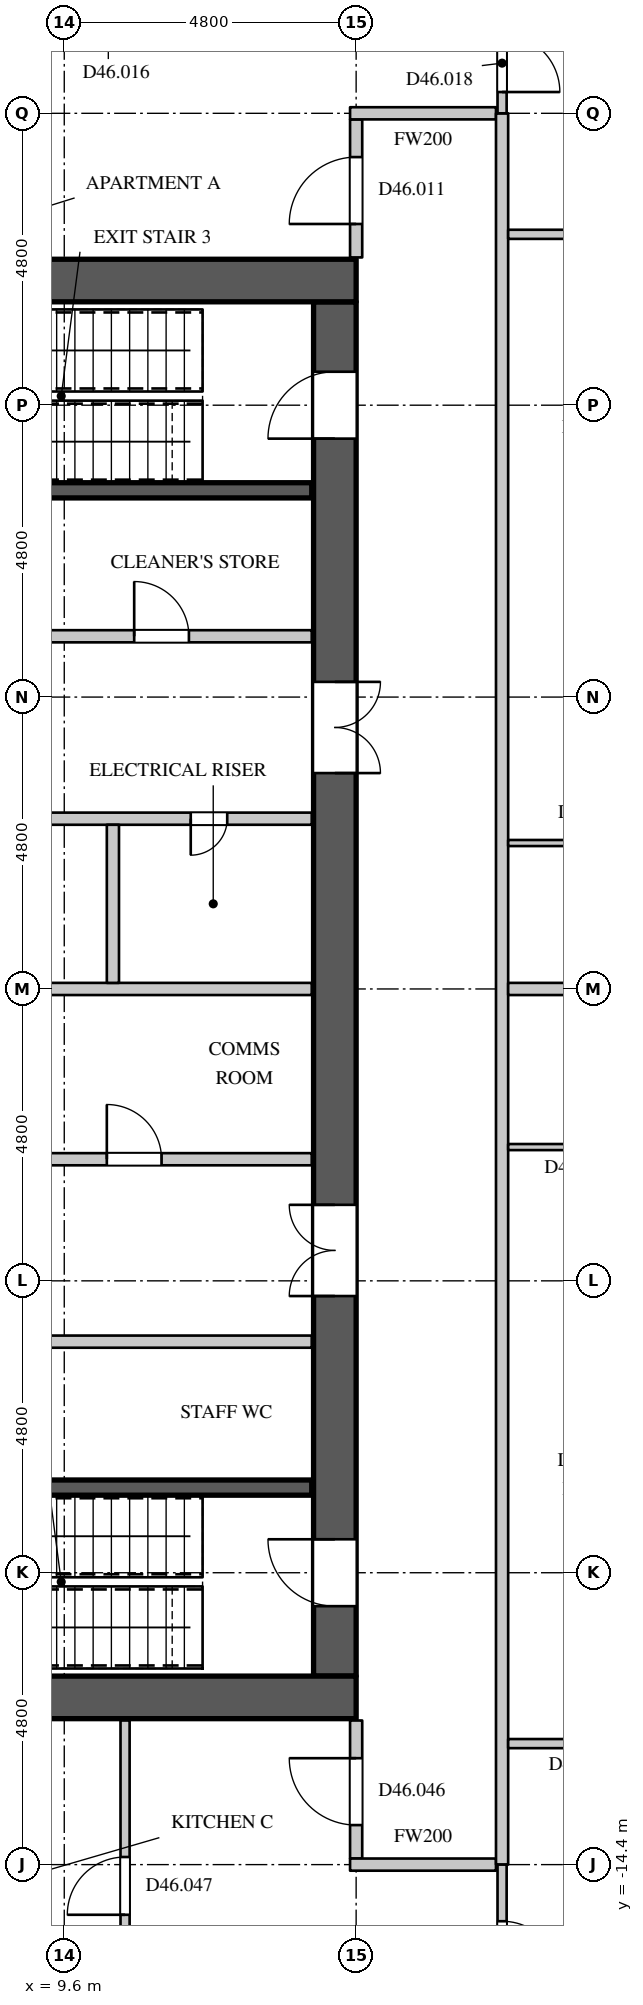
"""IFC4 building model, lengths in metres.
Left out: names, types, materials, properties, quantities, classifications, styles, units other than length and angle.
Written with IfcOpenShell. Run it as: python <this file> out.ifc"""

import sys

from ifc_helpers import new_model, si_unit, direction, frame, frame_2d, origin, place, context, subcontext, project, spatial, rectangle, extrude, element, fill, save


model = new_model("IFC4")
c1 = context("Model", 3, precision=1e-05, world=origin(), true_north=direction((0.0, 1.0)))
c2 = subcontext(c1, "Body", "Model", "MODEL_VIEW")
j1 = project(units=[si_unit("LENGTHUNIT", "METRE"), si_unit("PLANEANGLEUNIT", "RADIAN")], contexts=[c1])
p1 = place(None, origin())
s1 = spatial("IfcSite", under=j1, at=p1, CompositionType="ELEMENT")
p2 = place(p1, origin())
s2 = spatial("IfcBuilding", under=s1, at=p2, CompositionType="ELEMENT")
p3 = place(p2, frame((0.0, 0.0, 200.1)))
s3 = spatial("IfcBuildingStorey", under=s2, at=p3, CompositionType="ELEMENT", Elevation=200.1)
for number, where, z_axis, x_axis in (
    (1, (-14.4, 11.65, 0.0), (0.0, 0.0, 1.0), (1.0, 0.0, 0.0)),
    (2, (-14.4, -11.65, 0.0), (0.0, 0.0, 1.0), (1.0, 0.0, 0.0)),
):
    element("IfcWall", number, at=place(p3, frame(where, z_axis=z_axis, x_axis=x_axis)), inside=s3, PredefinedType="SHEAR", context=c2, shape_type="SweptSolid", body=[
        extrude(rectangle(XDim=28.8, YDim=0.7, at=frame_2d((14.4, 0.0))), origin(), (0.0, 0.0, 1.0), 4.2),
    ])
p4 = place(p3, frame((14.05, -11.3, 0.0), z_axis=(0.0, 0.0, 1.0), x_axis=(0.0, 1.0, 0.0)))
e3 = element("IfcWall", 3, at=p4, inside=s3, PredefinedType="SHEAR", context=c2, shape_type="SweptSolid", body=[
    extrude(rectangle(XDim=22.6, YDim=0.7, at=frame_2d((11.3, 0.0))), origin(), (0.0, 0.0, 1.0), 4.2),
])
p5 = place(p4, frame((20.35, 0.0, 0.0)))
e4 = element("IfcOpeningElement", 4, at=p5, cuts=e3, PredefinedType="OPENING", context=c2, shape_type="SweptSolid", body=[
    extrude(rectangle(XDim=1.1, YDim=2.2, at=frame_2d((0.55, 1.1))), frame((0.0, 0.36, 0.0), z_axis=(0.0, -1.0, 0.0), x_axis=(1.0, 0.0, 0.0)), (0.0, 0.0, 1.0), 0.72),
])
p6 = place(p4, frame((1.15, 0.0, 0.0)))
e5 = element("IfcOpeningElement", 5, at=p6, cuts=e3, PredefinedType="OPENING", context=c2, shape_type="SweptSolid", body=[
    extrude(rectangle(XDim=1.1, YDim=2.2, at=frame_2d((0.55, 1.1))), frame((0.0, 0.36, 0.0), z_axis=(0.0, -1.0, 0.0), x_axis=(1.0, 0.0, 0.0)), (0.0, 0.0, 1.0), 0.72),
])
p7 = place(p4, frame((14.85, 0.0, 0.0)))
e6 = element("IfcOpeningElement", 6, at=p7, cuts=e3, PredefinedType="OPENING", context=c2, shape_type="SweptSolid", body=[
    extrude(rectangle(XDim=1.5, YDim=2.4, at=frame_2d((0.75, 1.2))), frame((0.0, 0.36, 0.0), z_axis=(0.0, -1.0, 0.0), x_axis=(1.0, 0.0, 0.0)), (0.0, 0.0, 1.0), 0.72),
])
p8 = place(p4, frame((6.25, 0.0, 0.0)))
e7 = element("IfcOpeningElement", 7, at=p8, cuts=e3, PredefinedType="OPENING", context=c2, shape_type="SweptSolid", body=[
    extrude(rectangle(XDim=1.5, YDim=2.4, at=frame_2d((0.75, 1.2))), frame((0.0, 0.36, 0.0), z_axis=(0.0, -1.0, 0.0), x_axis=(1.0, 0.0, 0.0)), (0.0, 0.0, 1.0), 0.72),
])
p9 = place(p3, frame((-7.7, 5.8, 0.0), z_axis=(0.0, 0.0, 1.0), x_axis=(1.0, 0.0, 0.0)))
e8 = element("IfcWall", 8, at=p9, inside=s3, PredefinedType="PARTITIONING", context=c2, shape_type="SweptSolid", body=[
    extrude(rectangle(XDim=21.37, YDim=0.2, at=frame_2d((10.685, 0.0))), origin(), (0.0, 0.0, 1.0), 3.798),
])
p10 = place(p9, frame((1.35, 0.0, 0.0)))
e9 = element("IfcOpeningElement", 9, at=p10, cuts=e8, PredefinedType="OPENING", context=c2, shape_type="SweptSolid", body=[
    extrude(rectangle(XDim=0.9, YDim=2.2, at=frame_2d((0.45, 1.1))), frame((0.0, 0.11, 0.0), z_axis=(0.0, -1.0, 0.0), x_axis=(1.0, 0.0, 0.0)), (0.0, 0.0, 1.0), 0.22),
])
p11 = place(p9, frame((5.85, 0.0, 0.0)))
e10 = element("IfcOpeningElement", 10, at=p11, cuts=e8, PredefinedType="OPENING", context=c2, shape_type="SweptSolid", body=[
    extrude(rectangle(XDim=0.9, YDim=2.2, at=frame_2d((0.45, 1.1))), frame((0.0, 0.11, 0.0), z_axis=(0.0, -1.0, 0.0), x_axis=(1.0, 0.0, 0.0)), (0.0, 0.0, 1.0), 0.22),
])
p12 = place(p9, frame((12.3, 0.0, 0.0)))
e11 = element("IfcOpeningElement", 11, at=p12, cuts=e8, PredefinedType="OPENING", context=c2, shape_type="SweptSolid", body=[
    extrude(rectangle(XDim=0.9, YDim=2.2, at=frame_2d((0.45, 1.1))), frame((0.0, 0.11, 0.0), z_axis=(0.0, -1.0, 0.0), x_axis=(1.0, 0.0, 0.0)), (0.0, 0.0, 1.0), 0.22),
])
p13 = place(p9, frame((18.45, 0.0, 0.0)))
e12 = element("IfcOpeningElement", 12, at=p13, cuts=e8, PredefinedType="OPENING", context=c2, shape_type="SweptSolid", body=[
    extrude(rectangle(XDim=0.9, YDim=2.2, at=frame_2d((0.45, 1.1))), frame((0.0, 0.11, 0.0), z_axis=(0.0, -1.0, 0.0), x_axis=(1.0, 0.0, 0.0)), (0.0, 0.0, 1.0), 0.22),
])
p14 = place(p3, frame((3.98, -5.8, 0.0), z_axis=(0.0, 0.0, 1.0), x_axis=(1.0, 0.0, 0.0)))
e13 = element("IfcWall", 13, at=p14, inside=s3, PredefinedType="PARTITIONING", context=c2, shape_type="SweptSolid", body=[
    extrude(rectangle(XDim=9.69, YDim=0.2, at=frame_2d((4.845, 0.0))), origin(), (0.0, 0.0, 1.0), 3.798),
])
p15 = place(p14, frame((4.4, 0.0, 0.0)))
e14 = element("IfcOpeningElement", 14, at=p15, cuts=e13, PredefinedType="OPENING", context=c2, shape_type="SweptSolid", body=[
    extrude(rectangle(XDim=0.9, YDim=2.2, at=frame_2d((0.45, 1.1))), frame((0.0, 0.11, 0.0), z_axis=(0.0, -1.0, 0.0), x_axis=(1.0, 0.0, 0.0)), (0.0, 0.0, 1.0), 0.22),
])
p16 = place(p3, frame((14.4, -14.3, 0.0), z_axis=(0.0, 0.0, 1.0), x_axis=(0.0, 1.0, 0.0)))
e15 = element("IfcWall", 15, at=p16, inside=s3, PredefinedType="PARTITIONING", context=c2, shape_type="SweptSolid", body=[
    extrude(rectangle(XDim=2.27, YDim=0.2, at=frame_2d((1.135, 0.0))), origin(), (0.0, 0.0, 1.0), 3.798),
])
p17 = place(p16, frame((0.55, 0.0, 0.0)))
e16 = element("IfcOpeningElement", 16, at=p17, cuts=e15, PredefinedType="OPENING", context=c2, shape_type="SweptSolid", body=[
    extrude(rectangle(XDim=1.1, YDim=2.4, at=frame_2d((0.55, 1.2))), frame((0.0, 0.11, 0.0), z_axis=(0.0, -1.0, 0.0), x_axis=(1.0, 0.0, 0.0)), (0.0, 0.0, 1.0), 0.22),
])
p18 = place(p3, frame((14.3, -14.4, 0.0), z_axis=(0.0, 0.0, 1.0), x_axis=(1.0, 0.0, 0.0)))
e17 = element("IfcWall", 17, at=p18, inside=s3, PredefinedType="PARTITIONING", context=c2, shape_type="SweptSolid", body=[
    extrude(rectangle(XDim=2.4, YDim=0.2, at=frame_2d((1.2, 0.0))), origin(), (0.0, 0.0, 1.0), 3.798),
])
p19 = place(p3, frame((14.4, 12.03, 0.0), z_axis=(0.0, 0.0, 1.0), x_axis=(0.0, 1.0, 0.0)))
e18 = element("IfcWall", 18, at=p19, inside=s3, PredefinedType="PARTITIONING", context=c2, shape_type="SweptSolid", body=[
    extrude(rectangle(XDim=2.27, YDim=0.2, at=frame_2d((1.135, 0.0))), origin(), (0.0, 0.0, 1.0), 3.798),
])
p20 = place(p19, frame((0.55, 0.0, 0.0)))
e19 = element("IfcOpeningElement", 19, at=p20, cuts=e18, PredefinedType="OPENING", context=c2, shape_type="SweptSolid", body=[
    extrude(rectangle(XDim=1.1, YDim=2.4, at=frame_2d((0.55, 1.2))), frame((0.0, 0.11, 0.0), z_axis=(0.0, -1.0, 0.0), x_axis=(1.0, 0.0, 0.0)), (0.0, 0.0, 1.0), 0.22),
])
p21 = place(p3, frame((14.3, 14.4, 0.0), z_axis=(0.0, 0.0, 1.0), x_axis=(1.0, 0.0, 0.0)))
e20 = element("IfcWall", 20, at=p21, inside=s3, PredefinedType="PARTITIONING", context=c2, shape_type="SweptSolid", body=[
    extrude(rectangle(XDim=2.4, YDim=0.2, at=frame_2d((1.2, 0.0))), origin(), (0.0, 0.0, 1.0), 3.798),
])
p22 = place(p3, frame((16.8, -14.4, 0.0), z_axis=(0.0, 0.0, 1.0), x_axis=(0.0, 1.0, 0.0)))
e21 = element("IfcWall", 21, at=p22, inside=s3, PredefinedType="PARTITIONING", context=c2, shape_type="SweptSolid", body=[
    extrude(rectangle(XDim=28.8, YDim=0.2, at=frame_2d((14.4, 0.0))), origin(), (0.0, 0.0, 1.0), 3.798),
])
p23 = place(p3, frame((10.6, -17.425, 0.0), z_axis=(0.0, 0.0, 1.0), x_axis=(0.0, 1.0, 0.0)))
e22 = element("IfcWall", 22, at=p23, inside=s3, PredefinedType="PARTITIONING", context=c2, shape_type="SweptSolid", body=[
    extrude(rectangle(XDim=5.395, YDim=0.15, at=frame_2d((2.698, 0.0))), origin(), (0.0, 0.0, 1.0), 3.798),
])
p24 = place(p23, frame((2.2, 0.0, 0.0)))
e23 = element("IfcOpeningElement", 23, at=p24, cuts=e22, PredefinedType="OPENING", context=c2, shape_type="SweptSolid", body=[
    extrude(rectangle(XDim=0.95, YDim=2.2, at=frame_2d((0.475, 1.1))), frame((0.0, 0.085, 0.0), z_axis=(0.0, -1.0, 0.0), x_axis=(1.0, 0.0, 0.0)), (0.0, 0.0, 1.0), 0.17),
])
p25 = place(p3, frame((16.8, -18.131, 0.0), z_axis=(0.0, 0.0, 1.0), x_axis=(0.0, 1.0, 0.0)))
e24 = element("IfcWall", 24, at=p25, inside=s3, PredefinedType="PARTITIONING", context=c2, shape_type="SweptSolid", body=[
    extrude(rectangle(XDim=3.731, YDim=0.15, at=frame_2d((1.865, 0.0))), origin(), (0.0, 0.0, 1.0), 3.798),
])
p26 = place(p25, frame((1.85, 0.0, 0.0)))
e25 = element("IfcOpeningElement", 25, at=p26, cuts=e24, PredefinedType="OPENING", context=c2, shape_type="SweptSolid", body=[
    extrude(rectangle(XDim=0.95, YDim=2.2, at=frame_2d((0.475, 1.1))), frame((0.0, 0.085, 0.0), z_axis=(0.0, -1.0, 0.0), x_axis=(1.0, 0.0, 0.0)), (0.0, 0.0, 1.0), 0.17),
])
p27 = place(p3, frame((16.9, -12.41, 0.0), z_axis=(0.0, 0.0, 1.0), x_axis=(1.0, 0.0, 0.0)))
e26 = element("IfcWall", 26, at=p27, inside=s3, PredefinedType="PARTITIONING", context=c2, shape_type="SweptSolid", body=[
    extrude(rectangle(XDim=5.629, YDim=0.15, at=frame_2d((2.815, 0.0))), origin(), (0.0, 0.0, 1.0), 3.798),
])
p28 = place(p27, frame((1.1, 0.0, 0.0)))
e27 = element("IfcOpeningElement", 27, at=p28, cuts=e26, PredefinedType="OPENING", context=c2, shape_type="SweptSolid", body=[
    extrude(rectangle(XDim=0.95, YDim=2.2, at=frame_2d((0.475, 1.1))), frame((0.0, 0.085, 0.0), z_axis=(0.0, -1.0, 0.0), x_axis=(1.0, 0.0, 0.0)), (0.0, 0.0, 1.0), 0.17),
])
p29 = place(p3, frame((16.9, 12.41, 0.0), z_axis=(0.0, 0.0, 1.0), x_axis=(1.0, 0.0, 0.0)))
e28 = element("IfcWall", 28, at=p29, inside=s3, PredefinedType="PARTITIONING", context=c2, shape_type="SweptSolid", body=[
    extrude(rectangle(XDim=5.629, YDim=0.15, at=frame_2d((2.815, 0.0))), origin(), (0.0, 0.0, 1.0), 3.798),
])
p30 = place(p29, frame((1.0, 0.0, 0.0)))
e29 = element("IfcOpeningElement", 29, at=p30, cuts=e28, PredefinedType="OPENING", context=c2, shape_type="SweptSolid", body=[
    extrude(rectangle(XDim=0.95, YDim=2.2, at=frame_2d((0.475, 1.1))), frame((0.0, 0.085, 0.0), z_axis=(0.0, -1.0, 0.0), x_axis=(1.0, 0.0, 0.0)), (0.0, 0.0, 1.0), 0.17),
])
p31 = place(p29, frame((4.05, 0.0, 0.0)))
e30 = element("IfcOpeningElement", 30, at=p31, cuts=e28, PredefinedType="OPENING", context=c2, shape_type="SweptSolid", body=[
    extrude(rectangle(XDim=0.95, YDim=2.2, at=frame_2d((0.475, 1.1))), frame((0.0, 0.085, 0.0), z_axis=(0.0, -1.0, 0.0), x_axis=(1.0, 0.0, 0.0)), (0.0, 0.0, 1.0), 0.17),
])
p32 = place(p3, frame((16.8, 14.4, 0.0), z_axis=(0.0, 0.0, 1.0), x_axis=(0.0, 1.0, 0.0)))
e31 = element("IfcWall", 31, at=p32, inside=s3, PredefinedType="PARTITIONING", context=c2, shape_type="SweptSolid", body=[
    extrude(rectangle(XDim=3.731, YDim=0.15, at=frame_2d((1.865, 0.0))), origin(), (0.0, 0.0, 1.0), 3.798),
])
p33 = place(p32, frame((0.35, 0.0, 0.0)))
e32 = element("IfcOpeningElement", 32, at=p33, cuts=e31, PredefinedType="OPENING", context=c2, shape_type="SweptSolid", body=[
    extrude(rectangle(XDim=0.95, YDim=2.2, at=frame_2d((0.475, 1.1))), frame((0.0, 0.085, 0.0), z_axis=(0.0, -1.0, 0.0), x_axis=(1.0, 0.0, 0.0)), (0.0, 0.0, 1.0), 0.17),
])
p34 = place(p3, frame((16.9, 0.0, 0.0), z_axis=(0.0, 0.0, 1.0), x_axis=(1.0, 0.0, 0.0)))
e33 = element("IfcWall", 33, at=p34, inside=s3, PredefinedType="PARTITIONING", context=c2, shape_type="SweptSolid", body=[
    extrude(rectangle(XDim=7.155, YDim=0.2, at=frame_2d((3.578, 0.0))), origin(), (0.0, 0.0, 1.0), 3.798),
])
p35 = place(p3, frame((-7.82, 2.8, 0.0), z_axis=(0.0, 0.0, 1.0), x_axis=(1.0, 0.0, 0.0)))
e34 = element("IfcWall", 34, at=p35, inside=s3, PredefinedType="PARTITIONING", context=c2, shape_type="SweptSolid", body=[
    extrude(rectangle(XDim=21.49, YDim=0.2, at=frame_2d((10.745, 0.0))), origin(), (0.0, 0.0, 1.0), 3.798),
])
p36 = place(p35, frame((19.5, 0.0, 0.0)))
e35 = element("IfcOpeningElement", 35, at=p36, cuts=e34, PredefinedType="OPENING", context=c2, shape_type="SweptSolid", body=[
    extrude(rectangle(XDim=0.6, YDim=2.0, at=frame_2d((0.3, 1.0))), frame((0.0, 0.11, 0.0), z_axis=(0.0, -1.0, 0.0), x_axis=(1.0, 0.0, 0.0)), (0.0, 0.0, 1.0), 0.22),
])
p37 = place(p35, frame((3.25, 0.0, 0.0)))
e36 = element("IfcOpeningElement", 36, at=p37, cuts=e34, PredefinedType="OPENING", context=c2, shape_type="SweptSolid", body=[
    extrude(rectangle(XDim=0.9, YDim=2.2, at=frame_2d((0.45, 1.1))), frame((0.0, 0.11, 0.0), z_axis=(0.0, -1.0, 0.0), x_axis=(1.0, 0.0, 0.0)), (0.0, 0.0, 1.0), 0.22),
])
p38 = place(p35, frame((12.25, 0.0, 0.0)))
e37 = element("IfcOpeningElement", 37, at=p38, cuts=e34, PredefinedType="OPENING", context=c2, shape_type="SweptSolid", body=[
    extrude(rectangle(XDim=0.9, YDim=2.2, at=frame_2d((0.45, 1.1))), frame((0.0, 0.11, 0.0), z_axis=(0.0, -1.0, 0.0), x_axis=(1.0, 0.0, 0.0)), (0.0, 0.0, 1.0), 0.22),
])
p39 = place(p3, frame((7.8, -2.8, 0.0), z_axis=(0.0, 0.0, 1.0), x_axis=(1.0, 0.0, 0.0)))
e38 = element("IfcWall", 38, at=p39, inside=s3, PredefinedType="PARTITIONING", context=c2, shape_type="SweptSolid", body=[
    extrude(rectangle(XDim=5.87, YDim=0.2, at=frame_2d((2.935, 0.0))), origin(), (0.0, 0.0, 1.0), 3.798),
])
p40 = place(p39, frame((2.5, 0.0, 0.0)))
e39 = element("IfcOpeningElement", 39, at=p40, cuts=e38, PredefinedType="OPENING", context=c2, shape_type="SweptSolid", body=[
    extrude(rectangle(XDim=0.9, YDim=2.2, at=frame_2d((0.45, 1.1))), frame((0.0, 0.11, 0.0), z_axis=(0.0, -1.0, 0.0), x_axis=(1.0, 0.0, 0.0)), (0.0, 0.0, 1.0), 0.22),
])
p41 = place(p3, frame((7.8, 0.0, 0.0), z_axis=(0.0, 0.0, 1.0), x_axis=(1.0, 0.0, 0.0)))
e40 = element("IfcWall", 40, at=p41, inside=s3, PredefinedType="PARTITIONING", context=c2, shape_type="SweptSolid", body=[
    extrude(rectangle(XDim=5.87, YDim=0.2, at=frame_2d((2.935, 0.0))), origin(), (0.0, 0.0, 1.0), 3.798),
])
p42 = place(p3, frame((10.4, 0.1, 0.0), z_axis=(0.0, 0.0, 1.0), x_axis=(0.0, 1.0, 0.0)))
e41 = element("IfcWall", 41, at=p42, inside=s3, PredefinedType="PARTITIONING", context=c2, shape_type="SweptSolid", body=[
    extrude(rectangle(XDim=2.6, YDim=0.2, at=frame_2d((1.3, 0.0))), origin(), (0.0, 0.0, 1.0), 3.798),
])
for number, where, z_axis, x_axis in (
    (42, (5.275, -8.2, 0.0), (0.0, 0.0, 1.0), (1.0, 0.0, 0.0)),
    (43, (5.275, 8.2, 0.0), (0.0, 0.0, 1.0), (1.0, 0.0, 0.0)),
):
    element("IfcWall", number, at=place(p3, frame(where, z_axis=z_axis, x_axis=x_axis)), inside=s3, PredefinedType="SHEAR", context=c2, shape_type="SweptSolid", body=[
        extrude(rectangle(XDim=8.395, YDim=0.25, at=frame_2d((4.198, 0.0))), origin(), (0.0, 0.0, 1.0), 3.798),
    ])
p43 = place(p3, frame((16.9, -2.6, 0.0), z_axis=(0.0, 0.0, 1.0), x_axis=(1.0, 0.0, 0.0)))
e44 = element("IfcWall", 44, at=p43, inside=s3, PredefinedType="PARTITIONING", context=c2, shape_type="SweptSolid", body=[
    extrude(rectangle(XDim=3.025, YDim=0.1, at=frame_2d((1.513, 0.0))), origin(), (0.0, 0.0, 1.0), 3.798),
])
p44 = place(p43, frame((1.05, 0.0, 0.0)))
e45 = element("IfcOpeningElement", 45, at=p44, cuts=e44, PredefinedType="OPENING", context=c2, shape_type="SweptSolid", body=[
    extrude(rectangle(XDim=0.9, YDim=2.2, at=frame_2d((0.45, 1.1))), frame((0.0, 0.06, 0.0), z_axis=(0.0, -1.0, 0.0), x_axis=(1.0, 0.0, 0.0)), (0.0, 0.0, 1.0), 0.12),
])
p45 = place(p3, frame((16.9, 2.4, 0.0), z_axis=(0.0, 0.0, 1.0), x_axis=(1.0, 0.0, 0.0)))
e46 = element("IfcWall", 46, at=p45, inside=s3, PredefinedType="PARTITIONING", context=c2, shape_type="SweptSolid", body=[
    extrude(rectangle(XDim=3.075, YDim=0.1, at=frame_2d((1.538, 0.0))), origin(), (0.0, 0.0, 1.0), 3.798),
])
p46 = place(p45, frame((1.05, 0.0, 0.0)))
e47 = element("IfcOpeningElement", 47, at=p46, cuts=e46, PredefinedType="OPENING", context=c2, shape_type="SweptSolid", body=[
    extrude(rectangle(XDim=0.9, YDim=2.2, at=frame_2d((0.45, 1.1))), frame((0.0, 0.06, 0.0), z_axis=(0.0, -1.0, 0.0), x_axis=(1.0, 0.0, 0.0)), (0.0, 0.0, 1.0), 0.12),
])
p47 = place(p36, origin())
e48 = element("IfcDoor", 48, at=p47, inside=s3, OperationType="SINGLE_SWING_RIGHT", PredefinedType="DOOR", context=c2, shape_type="SweptSolid", body=[
    extrude(rectangle(XDim=0.6, YDim=2.0, at=frame_2d((0.3, 1.0))), frame((0.0, 0.025, 0.0), z_axis=(0.0, -1.0, 0.0), x_axis=(1.0, 0.0, 0.0)), (0.0, 0.0, 1.0), 0.05),
])
fill(e35, e48)
p48 = place(p40, origin())
e49 = element("IfcDoor", 49, at=p48, inside=s3, OperationType="SINGLE_SWING_LEFT", PredefinedType="DOOR", context=c2, shape_type="SweptSolid", body=[
    extrude(rectangle(XDim=0.9, YDim=2.2, at=frame_2d((0.45, 1.1))), frame((0.0, 0.025, 0.0), z_axis=(0.0, -1.0, 0.0), x_axis=(1.0, 0.0, 0.0)), (0.0, 0.0, 1.0), 0.05),
])
fill(e39, e49)
p49 = place(p13, origin())
e50 = element("IfcDoor", 50, at=p49, inside=s3, OperationType="SINGLE_SWING_LEFT", PredefinedType="DOOR", context=c2, shape_type="SweptSolid", body=[
    extrude(rectangle(XDim=0.9, YDim=2.2, at=frame_2d((0.45, 1.1))), frame((0.0, 0.025, 0.0), z_axis=(0.0, -1.0, 0.0), x_axis=(1.0, 0.0, 0.0)), (0.0, 0.0, 1.0), 0.05),
])
fill(e12, e50)
p50 = place(p5, origin())
e51 = element("IfcDoor", 51, at=p50, inside=s3, OperationType="SINGLE_SWING_LEFT", PredefinedType="DOOR", context=c2, shape_type="SweptSolid", body=[
    extrude(rectangle(XDim=1.1, YDim=2.2, at=frame_2d((0.55, 1.1))), frame((0.0, 0.345, 0.0), z_axis=(0.0, -1.0, 0.0), x_axis=(1.0, 0.0, 0.0)), (0.0, 0.0, 1.0), 0.05),
])
fill(e4, e51)
p51 = place(p6, origin())
e52 = element("IfcDoor", 52, at=p51, inside=s3, OperationType="SINGLE_SWING_RIGHT", PredefinedType="DOOR", context=c2, shape_type="SweptSolid", body=[
    extrude(rectangle(XDim=1.1, YDim=2.2, at=frame_2d((0.55, 1.1))), frame((0.0, 0.345, 0.0), z_axis=(0.0, -1.0, 0.0), x_axis=(1.0, 0.0, 0.0)), (0.0, 0.0, 1.0), 0.05),
])
fill(e5, e52)
p52 = place(p7, origin())
e53 = element("IfcDoor", 53, at=p52, inside=s3, OperationType="DOUBLE_DOOR_SINGLE_SWING", PredefinedType="DOOR", context=c2, shape_type="SweptSolid", body=[
    extrude(rectangle(XDim=1.5, YDim=2.4, at=frame_2d((0.75, 1.2))), frame((0.0, -0.295, 0.0), z_axis=(0.0, -1.0, 0.0), x_axis=(1.0, 0.0, 0.0)), (0.0, 0.0, 1.0), 0.05),
])
fill(e6, e53)
p53 = place(p8, origin())
e54 = element("IfcDoor", 54, at=p53, inside=s3, OperationType="DOUBLE_DOOR_SINGLE_SWING", PredefinedType="DOOR", context=c2, shape_type="SweptSolid", body=[
    extrude(rectangle(XDim=1.5, YDim=2.4, at=frame_2d((0.75, 1.2))), frame((0.0, 0.345, 0.0), z_axis=(0.0, -1.0, 0.0), x_axis=(1.0, 0.0, 0.0)), (0.0, 0.0, 1.0), 0.05),
])
fill(e7, e54)
p54 = place(p20, origin())
e55 = element("IfcDoor", 55, at=p54, inside=s3, OperationType="SINGLE_SWING_LEFT", PredefinedType="DOOR", context=c2, shape_type="SweptSolid", body=[
    extrude(rectangle(XDim=1.1, YDim=2.4, at=frame_2d((0.55, 1.2))), frame((0.0, 0.025, 0.0), z_axis=(0.0, -1.0, 0.0), x_axis=(1.0, 0.0, 0.0)), (0.0, 0.0, 1.0), 0.05),
])
fill(e19, e55)
p55 = place(p33, origin())
e56 = element("IfcDoor", 56, at=p55, inside=s3, OperationType="SINGLE_SWING_RIGHT", PredefinedType="DOOR", context=c2, shape_type="SweptSolid", body=[
    extrude(rectangle(XDim=0.95, YDim=2.2, at=frame_2d((0.475, 1.1))), frame((0.0, 0.025, 0.0), z_axis=(0.0, -1.0, 0.0), x_axis=(1.0, 0.0, 0.0)), (0.0, 0.0, 1.0), 0.05),
])
fill(e32, e56)
p56 = place(p17, origin())
e57 = element("IfcDoor", 57, at=p56, inside=s3, OperationType="SINGLE_SWING_RIGHT", PredefinedType="DOOR", context=c2, shape_type="SweptSolid", body=[
    extrude(rectangle(XDim=1.1, YDim=2.4, at=frame_2d((0.55, 1.2))), frame((0.0, 0.025, 0.0), z_axis=(0.0, -1.0, 0.0), x_axis=(1.0, 0.0, 0.0)), (0.0, 0.0, 1.0), 0.05),
])
fill(e16, e57)
p57 = place(p24, origin())
e58 = element("IfcDoor", 58, at=p57, inside=s3, OperationType="SINGLE_SWING_LEFT", PredefinedType="DOOR", context=c2, shape_type="SweptSolid", body=[
    extrude(rectangle(XDim=0.95, YDim=2.2, at=frame_2d((0.475, 1.1))), frame((0.0, 0.025, 0.0), z_axis=(0.0, -1.0, 0.0), x_axis=(1.0, 0.0, 0.0)), (0.0, 0.0, 1.0), 0.05),
])
fill(e23, e58)
p58 = place(p26, origin())
e59 = element("IfcDoor", 59, at=p58, inside=s3, OperationType="SINGLE_SWING_RIGHT", PredefinedType="DOOR", context=c2, shape_type="SweptSolid", body=[
    extrude(rectangle(XDim=0.95, YDim=2.2, at=frame_2d((0.475, 1.1))), frame((0.0, 0.025, 0.0), z_axis=(0.0, -1.0, 0.0), x_axis=(1.0, 0.0, 0.0)), (0.0, 0.0, 1.0), 0.05),
])
fill(e25, e59)
save(model, sys.argv[1])
